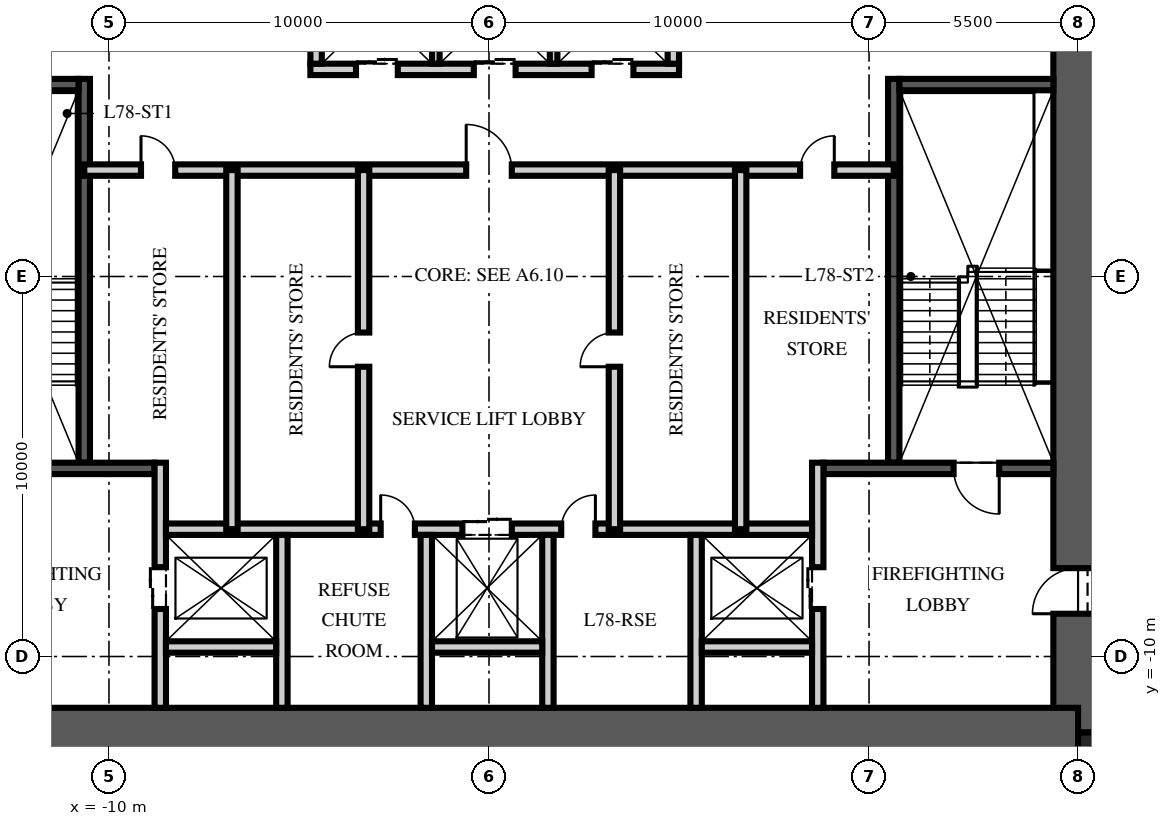
"""IFC4 building model, lengths in metres.
Left out: names, types, materials, properties, quantities, classifications, styles, units other than length and angle.
Written with IfcOpenShell. Run it as: python <this file> out.ifc"""

import sys

from ifc_helpers import new_model, si_unit, direction, frame, frame_2d, origin, origin_2d, place, context, subcontext, project, spatial, rectangle, extrude, element, fill, save


model = new_model("IFC4")
c1 = context("Model", 3, precision=1e-05, world=origin(), true_north=direction((0.0, 1.0)))
c2 = subcontext(c1, "Body", "Model", "MODEL_VIEW")
j1 = project(units=[si_unit("LENGTHUNIT", "METRE"), si_unit("PLANEANGLEUNIT", "RADIAN")], contexts=[c1])
p1 = place(None, origin())
s1 = spatial("IfcSite", under=j1, at=p1, CompositionType="ELEMENT")
p2 = place(p1, origin())
s2 = spatial("IfcBuilding", under=s1, at=p2, CompositionType="ELEMENT")
p3 = place(p2, frame((0.0, 0.0, 312.0)))
s3 = spatial("IfcBuildingStorey", under=s2, at=p3, CompositionType="ELEMENT", Elevation=312.0)
p4 = place(p3, frame((15.5, -12.0, -0.25), z_axis=(0.0, 0.0, 1.0), x_axis=(0.0, 1.0, 0.0)))
e1 = element("IfcWall", 1, at=p4, inside=s3, PredefinedType="SHEAR", context=c2, shape_type="SweptSolid", body=[
    extrude(rectangle(XDim=24.0, YDim=1.3, at=frame_2d((12.0, 0.0))), origin(), (0.0, 0.0, 1.0), 3.75),
])
p5 = place(p4, frame((3.125, 0.0, 0.25)))
e2 = element("IfcOpeningElement", 2, at=p5, cuts=e1, PredefinedType="OPENING", context=c2, shape_type="SweptSolid", body=[
    extrude(rectangle(XDim=1.2, YDim=2.1, at=frame_2d((0.6, 1.05))), frame((0.0, 0.66, 0.0), z_axis=(0.0, -1.0, 0.0), x_axis=(1.0, 0.0, 0.0)), (0.0, 0.0, 1.0), 1.32),
])
p6 = place(p4, frame((19.375, 0.0, 0.25)))
e3 = element("IfcOpeningElement", 3, at=p6, cuts=e1, PredefinedType="OPENING", context=c2, shape_type="SweptSolid", body=[
    extrude(rectangle(XDim=1.8, YDim=2.1, at=frame_2d((0.9, 1.05))), frame((0.0, 0.66, 0.0), z_axis=(0.0, -1.0, 0.0), x_axis=(1.0, 0.0, 0.0)), (0.0, 0.0, 1.0), 1.32),
])
p7 = place(p3, frame((-15.5, -12.0, -0.25), z_axis=(0.0, 0.0, 1.0), x_axis=(1.0, 0.0, 0.0)))
e4 = element("IfcWall", 4, at=p7, inside=s3, PredefinedType="SHEAR", context=c2, shape_type="SweptSolid", body=[
    extrude(rectangle(XDim=31.0, YDim=1.3, at=frame_2d((15.5, 0.0))), origin(), (0.0, 0.0, 1.0), 3.75),
])
p8 = place(p3, frame((15.825, -12.325, -0.25), z_axis=(0.0, 0.0, 1.0), x_axis=(1.0, 0.0, 0.0)))
e5 = element("IfcColumn", 5, at=p8, inside=s3, PredefinedType="COLUMN", context=c2, shape_type="SweptSolid", body=[
    extrude(rectangle(XDim=0.65, YDim=0.65, at=origin_2d()), origin(), (0.0, 0.0, 1.0), 3.75),
])
p9 = place(p3, frame((-10.65, -4.9, 0.0), z_axis=(0.0, 0.0, 1.0), x_axis=(0.0, 1.0, 0.0)))
e6 = element("IfcWall", 6, at=p9, inside=s3, PredefinedType="SOLIDWALL", context=c2, shape_type="SweptSolid", body=[
    extrude(rectangle(XDim=10.1, YDim=0.3, at=frame_2d((5.05, 0.0))), origin(), (0.0, 0.0, 1.0), 3.5),
])
p10 = place(p3, frame((-14.85, -5.05, 0.0), z_axis=(0.0, 0.0, 1.0), x_axis=(1.0, 0.0, 0.0)))
e7 = element("IfcWall", 7, at=p10, inside=s3, PredefinedType="SOLIDWALL", context=c2, shape_type="SweptSolid", body=[
    extrude(rectangle(XDim=6.05, YDim=0.3, at=frame_2d((3.025, 0.0))), origin(), (0.0, 0.0, 1.0), 3.5),
])
p11 = place(p10, frame((1.425, 0.0, 0.0)))
e8 = element("IfcOpeningElement", 8, at=p11, cuts=e7, PredefinedType="OPENING", context=c2, shape_type="SweptSolid", body=[
    extrude(rectangle(XDim=1.2, YDim=2.1, at=frame_2d((0.6, 1.05))), frame((0.0, 0.16, 0.0), z_axis=(0.0, -1.0, 0.0), x_axis=(1.0, 0.0, 0.0)), (0.0, 0.0, 1.0), 0.32),
])
p12 = place(p3, frame((-14.85, 5.05, 0.0), z_axis=(0.0, 0.0, 1.0), x_axis=(1.0, 0.0, 0.0)))
e9 = element("IfcWall", 9, at=p12, inside=s3, PredefinedType="SOLIDWALL", context=c2, shape_type="SweptSolid", body=[
    extrude(rectangle(XDim=4.05, YDim=0.3, at=frame_2d((2.025, 0.0))), origin(), (0.0, 0.0, 1.0), 3.5),
])
p13 = place(p3, frame((-8.65, -11.35, 0.0), z_axis=(0.0, 0.0, 1.0), x_axis=(0.0, 1.0, 0.0)))
e10 = element("IfcWall", 10, at=p13, inside=s3, PredefinedType="PARTITIONING", context=c2, shape_type="SweptSolid", body=[
    extrude(rectangle(XDim=6.45, YDim=0.3, at=frame_2d((3.225, 0.0))), origin(), (0.0, 0.0, 1.0), 3.5),
])
p14 = place(p13, frame((2.6, 0.0, 0.0)))
e11 = element("IfcOpeningElement", 11, at=p14, cuts=e10, PredefinedType="OPENING", context=c2, shape_type="SweptSolid", body=[
    extrude(rectangle(XDim=1.1, YDim=2.1, at=frame_2d((0.55, 1.05))), frame((0.0, 0.16, 0.0), z_axis=(0.0, -1.0, 0.0), x_axis=(1.0, 0.0, 0.0)), (0.0, 0.0, 1.0), 0.32),
])
p15 = place(p3, frame((10.65, -4.9, 0.0), z_axis=(0.0, 0.0, 1.0), x_axis=(0.0, 1.0, 0.0)))
e12 = element("IfcWall", 12, at=p15, inside=s3, PredefinedType="SOLIDWALL", context=c2, shape_type="SweptSolid", body=[
    extrude(rectangle(XDim=10.1, YDim=0.3, at=frame_2d((5.05, 0.0))), origin(), (0.0, 0.0, 1.0), 3.5),
])
p16 = place(p3, frame((14.85, -5.05, 0.0), z_axis=(0.0, 0.0, 1.0), x_axis=(-1.0, 0.0, 0.0)))
e13 = element("IfcWall", 13, at=p16, inside=s3, PredefinedType="SOLIDWALL", context=c2, shape_type="SweptSolid", body=[
    extrude(rectangle(XDim=6.05, YDim=0.3, at=frame_2d((3.025, 0.0))), origin(), (0.0, 0.0, 1.0), 3.5),
])
p17 = place(p16, frame((1.425, 0.0, 0.0)))
e14 = element("IfcOpeningElement", 14, at=p17, cuts=e13, PredefinedType="OPENING", context=c2, shape_type="SweptSolid", body=[
    extrude(rectangle(XDim=1.2, YDim=2.1, at=frame_2d((0.6, 1.05))), frame((0.0, 0.16, 0.0), z_axis=(0.0, -1.0, 0.0), x_axis=(1.0, 0.0, 0.0)), (0.0, 0.0, 1.0), 0.32),
])
p18 = place(p3, frame((14.85, 5.05, 0.0), z_axis=(0.0, 0.0, 1.0), x_axis=(-1.0, 0.0, 0.0)))
e15 = element("IfcWall", 15, at=p18, inside=s3, PredefinedType="SOLIDWALL", context=c2, shape_type="SweptSolid", body=[
    extrude(rectangle(XDim=4.05, YDim=0.3, at=frame_2d((2.025, 0.0))), origin(), (0.0, 0.0, 1.0), 3.5),
])
p19 = place(p3, frame((8.65, -11.35, 0.0), z_axis=(0.0, 0.0, 1.0), x_axis=(0.0, 1.0, 0.0)))
e16 = element("IfcWall", 16, at=p19, inside=s3, PredefinedType="PARTITIONING", context=c2, shape_type="SweptSolid", body=[
    extrude(rectangle(XDim=6.45, YDim=0.3, at=frame_2d((3.225, 0.0))), origin(), (0.0, 0.0, 1.0), 3.5),
])
p20 = place(p19, frame((2.6, 0.0, 0.0)))
e17 = element("IfcOpeningElement", 17, at=p20, cuts=e16, PredefinedType="OPENING", context=c2, shape_type="SweptSolid", body=[
    extrude(rectangle(XDim=1.1, YDim=2.1, at=frame_2d((0.55, 1.05))), frame((0.0, 0.16, 0.0), z_axis=(0.0, -1.0, 0.0), x_axis=(1.0, 0.0, 0.0)), (0.0, 0.0, 1.0), 0.32),
])
p21 = place(p3, frame((-8.5, -6.65, 0.0), z_axis=(0.0, 0.0, 1.0), x_axis=(1.0, 0.0, 0.0)))
e18 = element("IfcWall", 18, at=p21, inside=s3, PredefinedType="PARTITIONING", context=c2, shape_type="SweptSolid", body=[
    extrude(rectangle(XDim=17.0, YDim=0.3, at=frame_2d((8.5, 0.0))), origin(), (0.0, 0.0, 1.0), 3.5),
])
p22 = place(p21, frame((7.8, 0.0, 0.0)))
e19 = element("IfcOpeningElement", 19, at=p22, cuts=e18, PredefinedType="OPENING", context=c2, shape_type="SweptSolid", body=[
    extrude(rectangle(XDim=1.3, YDim=2.4, at=frame_2d((0.65, 1.2))), frame((0.0, 0.16, 0.0), z_axis=(0.0, -1.0, 0.0), x_axis=(1.0, 0.0, 0.0)), (0.0, 0.0, 1.0), 0.32),
])
p23 = place(p21, frame((5.65, 0.0, 0.0)))
e20 = element("IfcOpeningElement", 20, at=p23, cuts=e18, PredefinedType="OPENING", context=c2, shape_type="SweptSolid", body=[
    extrude(rectangle(XDim=0.9, YDim=2.1, at=frame_2d((0.45, 1.05))), frame((0.0, 0.16, 0.0), z_axis=(0.0, -1.0, 0.0), x_axis=(1.0, 0.0, 0.0)), (0.0, 0.0, 1.0), 0.32),
])
p24 = place(p21, frame((10.4, 0.0, 0.0)))
e21 = element("IfcOpeningElement", 21, at=p24, cuts=e18, PredefinedType="OPENING", context=c2, shape_type="SweptSolid", body=[
    extrude(rectangle(XDim=0.9, YDim=2.1, at=frame_2d((0.45, 1.05))), frame((0.0, 0.16, 0.0), z_axis=(0.0, -1.0, 0.0), x_axis=(1.0, 0.0, 0.0)), (0.0, 0.0, 1.0), 0.32),
])
for number, where, z_axis, x_axis in (
    (22, (-5.45, -11.35, 0.0), (0.0, 0.0, 1.0), (0.0, 1.0, 0.0)),
    (23, (-1.65, -11.35, 0.0), (0.0, 0.0, 1.0), (0.0, 1.0, 0.0)),
    (24, (1.55, -11.35, 0.0), (0.0, 0.0, 1.0), (0.0, 1.0, 0.0)),
    (25, (5.45, -11.35, 0.0), (0.0, 0.0, 1.0), (0.0, 1.0, 0.0)),
):
    element("IfcWall", number, at=place(p3, frame(where, z_axis=z_axis, x_axis=x_axis)), inside=s3, PredefinedType="PARTITIONING", context=c2, shape_type="SweptSolid", body=[
        extrude(rectangle(XDim=4.55, YDim=0.3, at=frame_2d((2.275, 0.0))), origin(), (0.0, 0.0, 1.0), 3.5),
    ])
for number, where, z_axis, x_axis in (
    (26, (-8.5, -9.75, 0.0), (0.0, 0.0, 1.0), (1.0, 0.0, 0.0)),
    (27, (-1.5, -9.75, 0.0), (0.0, 0.0, 1.0), (1.0, 0.0, 0.0)),
    (28, (5.6, -9.75, 0.0), (0.0, 0.0, 1.0), (1.0, 0.0, 0.0)),
):
    element("IfcWall", number, at=place(p3, frame(where, z_axis=z_axis, x_axis=x_axis)), inside=s3, PredefinedType="PARTITIONING", context=c2, shape_type="SweptSolid", body=[
        extrude(rectangle(XDim=2.9, YDim=0.3, at=frame_2d((1.45, 0.0))), origin(), (0.0, 0.0, 1.0), 3.5),
    ])
p25 = place(p3, frame((-4.7, 5.45, 0.0), z_axis=(0.0, 0.0, 1.0), x_axis=(1.0, 0.0, 0.0)))
e29 = element("IfcWall", 29, at=p25, inside=s3, PredefinedType="PARTITIONING", context=c2, shape_type="SweptSolid", body=[
    extrude(rectangle(XDim=9.7, YDim=0.3, at=frame_2d((4.85, 0.0))), origin(), (0.0, 0.0, 1.0), 3.5),
])
p26 = place(p25, frame((1.2, 0.0, 0.0)))
e30 = element("IfcOpeningElement", 30, at=p26, cuts=e29, PredefinedType="OPENING", context=c2, shape_type="SweptSolid", body=[
    extrude(rectangle(XDim=1.1, YDim=2.1, at=frame_2d((0.55, 1.05))), frame((0.0, 0.16, 0.0), z_axis=(0.0, -1.0, 0.0), x_axis=(1.0, 0.0, 0.0)), (0.0, 0.0, 1.0), 0.32),
])
p27 = place(p25, frame((4.3, 0.0, 0.0)))
e31 = element("IfcOpeningElement", 31, at=p27, cuts=e29, PredefinedType="OPENING", context=c2, shape_type="SweptSolid", body=[
    extrude(rectangle(XDim=1.1, YDim=2.1, at=frame_2d((0.55, 1.05))), frame((0.0, 0.16, 0.0), z_axis=(0.0, -1.0, 0.0), x_axis=(1.0, 0.0, 0.0)), (0.0, 0.0, 1.0), 0.32),
])
p28 = place(p25, frame((7.4, 0.0, 0.0)))
e32 = element("IfcOpeningElement", 32, at=p28, cuts=e29, PredefinedType="OPENING", context=c2, shape_type="SweptSolid", body=[
    extrude(rectangle(XDim=1.1, YDim=2.1, at=frame_2d((0.55, 1.05))), frame((0.0, 0.16, 0.0), z_axis=(0.0, -1.0, 0.0), x_axis=(1.0, 0.0, 0.0)), (0.0, 0.0, 1.0), 0.32),
])
for number, where, z_axis, x_axis in (
    (33, (-4.55, 5.6, 0.0), (0.0, 0.0, 1.0), (0.0, 1.0, 0.0)),
    (34, (4.85, 5.6, 0.0), (0.0, 0.0, 1.0), (0.0, 1.0, 0.0)),
):
    element("IfcWall", number, at=place(p3, frame(where, z_axis=z_axis, x_axis=x_axis)), inside=s3, PredefinedType="PARTITIONING", context=c2, shape_type="SweptSolid", body=[
        extrude(rectangle(XDim=2.8, YDim=0.3, at=frame_2d((1.4, 0.0))), origin(), (0.0, 0.0, 1.0), 3.5),
    ])
for number, where, z_axis, x_axis in (
    (35, (-1.4, 5.6, 0.0), (0.0, 0.0, 1.0), (0.0, 1.0, 0.0)),
    (36, (1.7, 5.6, 0.0), (0.0, 0.0, 1.0), (0.0, 1.0, 0.0)),
):
    element("IfcWall", number, at=place(p3, frame(where, z_axis=z_axis, x_axis=x_axis)), inside=s3, PredefinedType="PARTITIONING", context=c2, shape_type="SweptSolid", body=[
        extrude(rectangle(XDim=2.8, YDim=0.2, at=frame_2d((1.4, 0.0))), origin(), (0.0, 0.0, 1.0), 3.5),
    ])
p29 = place(p3, frame((-10.65, 2.8, 0.0), z_axis=(0.0, 0.0, 1.0), x_axis=(1.0, 0.0, 0.0)))
e37 = element("IfcWall", 37, at=p29, inside=s3, PredefinedType="PARTITIONING", context=c2, shape_type="SweptSolid", body=[
    extrude(rectangle(XDim=21.3, YDim=0.3, at=frame_2d((10.65, 0.0))), origin(), (0.0, 0.0, 1.0), 3.5),
])
p30 = place(p29, frame((10.05, 0.0, 0.0)))
e38 = element("IfcOpeningElement", 38, at=p30, cuts=e37, PredefinedType="OPENING", context=c2, shape_type="SweptSolid", body=[
    extrude(rectangle(XDim=1.2, YDim=2.1, at=frame_2d((0.6, 1.05))), frame((0.0, 0.16, 0.0), z_axis=(0.0, -1.0, 0.0), x_axis=(1.0, 0.0, 0.0)), (0.0, 0.0, 1.0), 0.32),
])
p31 = place(p29, frame((1.493, 0.0, 0.0)))
e39 = element("IfcOpeningElement", 39, at=p31, cuts=e37, PredefinedType="OPENING", context=c2, shape_type="SweptSolid", body=[
    extrude(rectangle(XDim=0.9, YDim=2.1, at=frame_2d((0.45, 1.05))), frame((0.0, 0.16, 0.0), z_axis=(0.0, -1.0, 0.0), x_axis=(1.0, 0.0, 0.0)), (0.0, 0.0, 1.0), 0.32),
])
p32 = place(p29, frame((18.836, 0.0, 0.0)))
e40 = element("IfcOpeningElement", 40, at=p32, cuts=e37, PredefinedType="OPENING", context=c2, shape_type="SweptSolid", body=[
    extrude(rectangle(XDim=0.9, YDim=2.1, at=frame_2d((0.45, 1.05))), frame((0.0, 0.16, 0.0), z_axis=(0.0, -1.0, 0.0), x_axis=(1.0, 0.0, 0.0)), (0.0, 0.0, 1.0), 0.32),
])
p33 = place(p3, frame((-3.3, -6.65, 0.0), z_axis=(0.0, 0.0, 1.0), x_axis=(0.0, 1.0, 0.0)))
e41 = element("IfcWall", 41, at=p33, inside=s3, PredefinedType="PARTITIONING", context=c2, shape_type="SweptSolid", body=[
    extrude(rectangle(XDim=9.45, YDim=0.3, at=frame_2d((4.725, 0.0))), origin(), (0.0, 0.0, 1.0), 3.5),
])
p34 = place(p33, frame((4.275, 0.0, 0.0)))
e42 = element("IfcOpeningElement", 42, at=p34, cuts=e41, PredefinedType="OPENING", context=c2, shape_type="SweptSolid", body=[
    extrude(rectangle(XDim=0.9, YDim=2.1, at=frame_2d((0.45, 1.05))), frame((0.0, 0.16, 0.0), z_axis=(0.0, -1.0, 0.0), x_axis=(1.0, 0.0, 0.0)), (0.0, 0.0, 1.0), 0.32),
])
p35 = place(p3, frame((3.3, -6.65, 0.0), z_axis=(0.0, 0.0, 1.0), x_axis=(0.0, 1.0, 0.0)))
e43 = element("IfcWall", 43, at=p35, inside=s3, PredefinedType="PARTITIONING", context=c2, shape_type="SweptSolid", body=[
    extrude(rectangle(XDim=9.45, YDim=0.3, at=frame_2d((4.725, 0.0))), origin(), (0.0, 0.0, 1.0), 3.5),
])
p36 = place(p35, frame((4.275, 0.0, 0.0)))
e44 = element("IfcOpeningElement", 44, at=p36, cuts=e43, PredefinedType="OPENING", context=c2, shape_type="SweptSolid", body=[
    extrude(rectangle(XDim=0.9, YDim=2.1, at=frame_2d((0.45, 1.05))), frame((0.0, 0.16, 0.0), z_axis=(0.0, -1.0, 0.0), x_axis=(1.0, 0.0, 0.0)), (0.0, 0.0, 1.0), 0.32),
])
for number, where, z_axis, x_axis in (
    (45, (-6.764, -6.65, 0.0), (0.0, 0.0, 1.0), (0.0, 1.0, 0.0)),
    (46, (6.622, -6.65, 0.0), (0.0, 0.0, 1.0), (0.0, 1.0, 0.0)),
):
    element("IfcWall", number, at=place(p3, frame(where, z_axis=z_axis, x_axis=x_axis)), inside=s3, PredefinedType="PARTITIONING", context=c2, shape_type="SweptSolid", body=[
        extrude(rectangle(XDim=9.45, YDim=0.3, at=frame_2d((4.725, 0.0))), origin(), (0.0, 0.0, 1.0), 3.5),
    ])
p37 = place(p17, origin())
e47 = element("IfcDoor", 47, at=p37, inside=s3, OperationType="SINGLE_SWING_LEFT", PredefinedType="DOOR", context=c2, shape_type="SweptSolid", body=[
    extrude(rectangle(XDim=1.2, YDim=2.1, at=frame_2d((0.6, 1.05))), frame((0.0, 0.025, 0.0), z_axis=(0.0, -1.0, 0.0), x_axis=(1.0, 0.0, 0.0)), (0.0, 0.0, 1.0), 0.05),
])
fill(e14, e47)
p38 = place(p5, origin())
e48 = element("IfcDoor", 48, at=p38, inside=s3, OperationType="SINGLE_SWING_LEFT", PredefinedType="DOOR", context=c2, shape_type="SweptSolid", body=[
    extrude(rectangle(XDim=1.2, YDim=2.1, at=frame_2d((0.6, 1.05))), frame((0.0, 0.025, 0.0), z_axis=(0.0, -1.0, 0.0), x_axis=(1.0, 0.0, 0.0)), (0.0, 0.0, 1.0), 0.05),
])
fill(e2, e48)
p39 = place(p14, origin())
e49 = element("IfcDoor", 49, at=p39, inside=s3, OperationType="DOUBLE_DOOR_SLIDING", PredefinedType="DOOR", context=c2, shape_type="SweptSolid", body=[
    extrude(rectangle(XDim=1.1, YDim=2.1, at=frame_2d((0.55, 1.05))), frame((0.0, 0.025, 0.0), z_axis=(0.0, -1.0, 0.0), x_axis=(1.0, 0.0, 0.0)), (0.0, 0.0, 1.0), 0.05),
])
fill(e11, e49)
p40 = place(p20, origin())
e50 = element("IfcDoor", 50, at=p40, inside=s3, OperationType="DOUBLE_DOOR_SLIDING", PredefinedType="DOOR", context=c2, shape_type="SweptSolid", body=[
    extrude(rectangle(XDim=1.1, YDim=2.1, at=frame_2d((0.55, 1.05))), frame((0.0, 0.025, 0.0), z_axis=(0.0, -1.0, 0.0), x_axis=(1.0, 0.0, 0.0)), (0.0, 0.0, 1.0), 0.05),
])
fill(e17, e50)
p41 = place(p26, origin())
e51 = element("IfcDoor", 51, at=p41, inside=s3, OperationType="DOUBLE_DOOR_SLIDING", PredefinedType="DOOR", context=c2, shape_type="SweptSolid", body=[
    extrude(rectangle(XDim=1.1, YDim=2.1, at=frame_2d((0.55, 1.05))), frame((0.0, 0.025, 0.0), z_axis=(0.0, -1.0, 0.0), x_axis=(1.0, 0.0, 0.0)), (0.0, 0.0, 1.0), 0.05),
])
fill(e30, e51)
p42 = place(p27, origin())
e52 = element("IfcDoor", 52, at=p42, inside=s3, OperationType="DOUBLE_DOOR_SLIDING", PredefinedType="DOOR", context=c2, shape_type="SweptSolid", body=[
    extrude(rectangle(XDim=1.1, YDim=2.1, at=frame_2d((0.55, 1.05))), frame((0.0, 0.025, 0.0), z_axis=(0.0, -1.0, 0.0), x_axis=(1.0, 0.0, 0.0)), (0.0, 0.0, 1.0), 0.05),
])
fill(e31, e52)
p43 = place(p28, origin())
e53 = element("IfcDoor", 53, at=p43, inside=s3, OperationType="DOUBLE_DOOR_SLIDING", PredefinedType="DOOR", context=c2, shape_type="SweptSolid", body=[
    extrude(rectangle(XDim=1.1, YDim=2.1, at=frame_2d((0.55, 1.05))), frame((0.0, 0.025, 0.0), z_axis=(0.0, -1.0, 0.0), x_axis=(1.0, 0.0, 0.0)), (0.0, 0.0, 1.0), 0.05),
])
fill(e32, e53)
p44 = place(p22, origin())
e54 = element("IfcDoor", 54, at=p44, inside=s3, OperationType="DOUBLE_DOOR_SLIDING", PredefinedType="DOOR", context=c2, shape_type="SweptSolid", body=[
    extrude(rectangle(XDim=1.3, YDim=2.4, at=frame_2d((0.65, 1.2))), frame((0.0, 0.025, 0.0), z_axis=(0.0, -1.0, 0.0), x_axis=(1.0, 0.0, 0.0)), (0.0, 0.0, 1.0), 0.05),
])
fill(e19, e54)
p45 = place(p30, origin())
e55 = element("IfcDoor", 55, at=p45, inside=s3, OperationType="SINGLE_SWING_LEFT", PredefinedType="DOOR", context=c2, shape_type="SweptSolid", body=[
    extrude(rectangle(XDim=1.2, YDim=2.1, at=frame_2d((0.6, 1.05))), frame((0.0, 0.025, 0.0), z_axis=(0.0, -1.0, 0.0), x_axis=(1.0, 0.0, 0.0)), (0.0, 0.0, 1.0), 0.05),
])
fill(e38, e55)
p46 = place(p23, origin())
e56 = element("IfcDoor", 56, at=p46, inside=s3, OperationType="SINGLE_SWING_LEFT", PredefinedType="DOOR", context=c2, shape_type="SweptSolid", body=[
    extrude(rectangle(XDim=0.9, YDim=2.1, at=frame_2d((0.45, 1.05))), frame((0.0, 0.025, 0.0), z_axis=(0.0, -1.0, 0.0), x_axis=(1.0, 0.0, 0.0)), (0.0, 0.0, 1.0), 0.05),
])
fill(e20, e56)
p47 = place(p24, origin())
e57 = element("IfcDoor", 57, at=p47, inside=s3, OperationType="SINGLE_SWING_RIGHT", PredefinedType="DOOR", context=c2, shape_type="SweptSolid", body=[
    extrude(rectangle(XDim=0.9, YDim=2.1, at=frame_2d((0.45, 1.05))), frame((0.0, 0.025, 0.0), z_axis=(0.0, -1.0, 0.0), x_axis=(1.0, 0.0, 0.0)), (0.0, 0.0, 1.0), 0.05),
])
fill(e21, e57)
p48 = place(p34, origin())
e58 = element("IfcDoor", 58, at=p48, inside=s3, OperationType="SINGLE_SWING_LEFT", PredefinedType="DOOR", context=c2, shape_type="SweptSolid", body=[
    extrude(rectangle(XDim=0.9, YDim=2.1, at=frame_2d((0.45, 1.05))), frame((0.0, 0.025, 0.0), z_axis=(0.0, -1.0, 0.0), x_axis=(1.0, 0.0, 0.0)), (0.0, 0.0, 1.0), 0.05),
])
fill(e42, e58)
p49 = place(p31, origin())
e59 = element("IfcDoor", 59, at=p49, inside=s3, OperationType="SINGLE_SWING_LEFT", PredefinedType="DOOR", context=c2, shape_type="SweptSolid", body=[
    extrude(rectangle(XDim=0.9, YDim=2.1, at=frame_2d((0.45, 1.05))), frame((0.0, 0.025, 0.0), z_axis=(0.0, -1.0, 0.0), x_axis=(1.0, 0.0, 0.0)), (0.0, 0.0, 1.0), 0.05),
])
fill(e39, e59)
p50 = place(p36, origin())
e60 = element("IfcDoor", 60, at=p50, inside=s3, OperationType="SINGLE_SWING_LEFT", PredefinedType="DOOR", context=c2, shape_type="SweptSolid", body=[
    extrude(rectangle(XDim=0.9, YDim=2.1, at=frame_2d((0.45, 1.05))), frame((0.0, 0.025, 0.0), z_axis=(0.0, -1.0, 0.0), x_axis=(1.0, 0.0, 0.0)), (0.0, 0.0, 1.0), 0.05),
])
fill(e44, e60)
p51 = place(p32, origin())
e61 = element("IfcDoor", 61, at=p51, inside=s3, OperationType="SINGLE_SWING_RIGHT", PredefinedType="DOOR", context=c2, shape_type="SweptSolid", body=[
    extrude(rectangle(XDim=0.9, YDim=2.1, at=frame_2d((0.45, 1.05))), frame((0.0, 0.025, 0.0), z_axis=(0.0, -1.0, 0.0), x_axis=(1.0, 0.0, 0.0)), (0.0, 0.0, 1.0), 0.05),
])
fill(e40, e61)
save(model, sys.argv[1])
